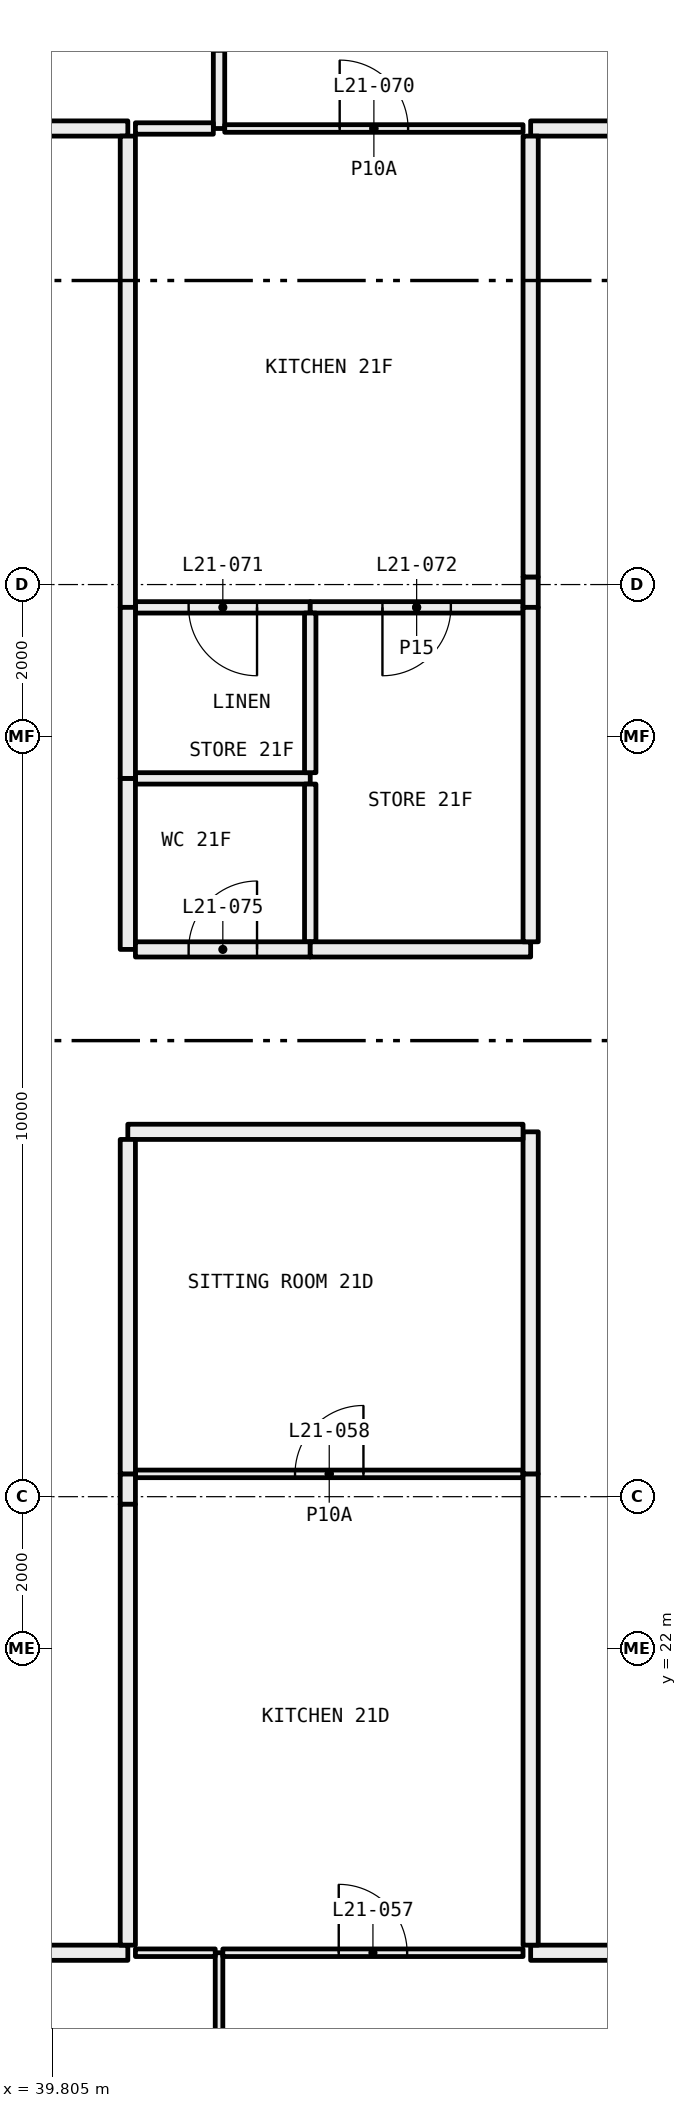
"""IFC4 building model, lengths in metres.
Left out: names, types, materials, properties, quantities, classifications, styles, units other than length and angle.
Written with IfcOpenShell. Run it as: python <this file> out.ifc"""

import sys

from ifc_helpers import new_model, si_unit, direction, frame, frame_2d, origin, place, context, subcontext, project, spatial, rectangle, extrude, element, fill, save


model = new_model("IFC4")
c1 = context("Model", 3, precision=1e-05, world=origin(), true_north=direction((0.0, 1.0)))
c2 = subcontext(c1, "Body", "Model", "MODEL_VIEW")
j1 = project(units=[si_unit("LENGTHUNIT", "METRE"), si_unit("PLANEANGLEUNIT", "RADIAN")], contexts=[c1])
p1 = place(None, origin())
s1 = spatial("IfcSite", under=j1, at=p1, CompositionType="ELEMENT")
p2 = place(p1, origin())
s2 = spatial("IfcBuilding", under=s1, at=p2, CompositionType="ELEMENT")
p3 = place(p2, frame((0.0, 0.0, 85.2)))
s3 = spatial("IfcBuildingStorey", under=s2, at=p3, CompositionType="ELEMENT", Elevation=85.2)
p4 = place(p3, frame((42.0, 12.05, 0.0), z_axis=(0.0, 0.0, 1.0), x_axis=(0.0, 1.0, 0.0)))
e1 = element("IfcWall", 1, at=p4, inside=s3, PredefinedType="PARTITIONING", context=c2, shape_type="SweptSolid", body=[
    extrude(rectangle(XDim=5.95, YDim=0.1, at=frame_2d((2.975, 0.0))), origin(), (0.0, 0.0, 1.0), 2.45),
])
p5 = place(p3, frame((41.95, 18.0, 0.0), z_axis=(0.0, 0.0, 1.0), x_axis=(-1.0, 0.0, 0.0)))
e2 = element("IfcWall", 2, at=p5, inside=s3, PredefinedType="PARTITIONING", context=c2, shape_type="SweptSolid", body=[
    extrude(rectangle(XDim=1.05, YDim=0.1, at=frame_2d((0.525, 0.0))), origin(), (0.0, 0.0, 1.0), 3.05),
])
p6 = place(p3, frame((40.8, 18.0, 0.0), z_axis=(0.0, 0.0, 1.0), x_axis=(-1.0, 0.0, 0.0)))
e3 = element("IfcWall", 3, at=p6, inside=s3, PredefinedType="PARTITIONING", context=c2, shape_type="SweptSolid", body=[
    extrude(rectangle(XDim=2.3, YDim=0.2, at=frame_2d((1.15, 0.0))), origin(), (0.0, 0.0, 1.0), 3.05),
])
p7 = place(p3, frame((46.0, 18.0, 0.0), z_axis=(0.0, 0.0, 1.0), x_axis=(-1.0, 0.0, 0.0)))
e4 = element("IfcWall", 4, at=p7, inside=s3, PredefinedType="PARTITIONING", context=c2, shape_type="SweptSolid", body=[
    extrude(rectangle(XDim=3.95, YDim=0.1, at=frame_2d((1.975, 0.0))), origin(), (0.0, 0.0, 1.0), 3.05),
])
p8 = place(p7, frame((1.525, 0.0, 0.0)))
e5 = element("IfcOpeningElement", 5, at=p8, cuts=e4, PredefinedType="OPENING", context=c2, shape_type="SweptSolid", body=[
    extrude(rectangle(XDim=0.9, YDim=2.1, at=frame_2d((0.45, 1.05))), frame((0.0, 0.06, 0.0), z_axis=(0.0, -1.0, 0.0), x_axis=(1.0, 0.0, 0.0)), (0.0, 0.0, 1.0), 0.12),
])
p9 = place(p3, frame((49.5, 18.0, 0.0), z_axis=(0.0, 0.0, 1.0), x_axis=(-1.0, 0.0, 0.0)))
e6 = element("IfcWall", 6, at=p9, inside=s3, PredefinedType="PARTITIONING", context=c2, shape_type="SweptSolid", body=[
    extrude(rectangle(XDim=3.4, YDim=0.2, at=frame_2d((1.7, 0.0))), origin(), (0.0, 0.0, 1.0), 3.05),
])
p10 = place(p3, frame((46.0, 24.3, 0.0), z_axis=(0.0, 0.0, 1.0), x_axis=(-1.0, 0.0, 0.0)))
e7 = element("IfcWall", 7, at=p10, inside=s3, PredefinedType="PARTITIONING", context=c2, shape_type="SweptSolid", body=[
    extrude(rectangle(XDim=5.1, YDim=0.1, at=frame_2d((2.55, 0.0))), origin(), (0.0, 0.0, 1.0), 3.05),
])
p11 = place(p10, frame((2.1, 0.0, 0.0)))
e8 = element("IfcOpeningElement", 8, at=p11, cuts=e7, PredefinedType="OPENING", context=c2, shape_type="SweptSolid", body=[
    extrude(rectangle(XDim=0.9, YDim=2.1, at=frame_2d((0.45, 1.05))), frame((0.0, 0.06, 0.0), z_axis=(0.0, -1.0, 0.0), x_axis=(1.0, 0.0, 0.0)), (0.0, 0.0, 1.0), 0.12),
])
p12 = place(p3, frame((40.8, 24.3, 0.0), z_axis=(0.0, 0.0, 1.0), x_axis=(0.0, -1.0, 0.0)))
e9 = element("IfcWall", 9, at=p12, inside=s3, PredefinedType="PARTITIONING", context=c2, shape_type="SweptSolid", body=[
    extrude(rectangle(XDim=0.4, YDim=0.2, at=frame_2d((0.2, 0.0))), origin(), (0.0, 0.0, 1.0), 2.45),
])
p13 = place(p3, frame((40.8, 23.9, 0.0), z_axis=(0.0, 0.0, 1.0), x_axis=(0.0, -1.0, 0.0)))
e10 = element("IfcWall", 10, at=p13, inside=s3, PredefinedType="PARTITIONING", context=c2, shape_type="SweptSolid", body=[
    extrude(rectangle(XDim=5.8, YDim=0.2, at=frame_2d((2.9, 0.0))), origin(), (0.0, 0.0, 1.0), 3.05),
])
p14 = place(p3, frame((46.1, 18.1, 0.0), z_axis=(0.0, 0.0, 1.0), x_axis=(0.0, 1.0, 0.0)))
e11 = element("IfcWall", 11, at=p14, inside=s3, PredefinedType="PARTITIONING", context=c2, shape_type="SweptSolid", body=[
    extrude(rectangle(XDim=6.2, YDim=0.2, at=frame_2d((3.1, 0.0))), origin(), (0.0, 0.0, 1.0), 2.45),
])
p15 = place(p3, frame((46.1, 24.3, 0.0), z_axis=(0.0, 0.0, 1.0), x_axis=(0.0, 1.0, 0.0)))
e12 = element("IfcWall", 12, at=p15, inside=s3, PredefinedType="PARTITIONING", context=c2, shape_type="SweptSolid", body=[
    extrude(rectangle(XDim=4.5, YDim=0.2, at=frame_2d((2.25, 0.0))), origin(), (0.0, 0.0, 1.0), 3.05),
])
p16 = place(p3, frame((46.0, 28.8, 0.0), z_axis=(0.0, 0.0, 1.0), x_axis=(-1.0, 0.0, 0.0)))
e13 = element("IfcWall", 13, at=p16, inside=s3, PredefinedType="PARTITIONING", context=c2, shape_type="SweptSolid", body=[
    extrude(rectangle(XDim=5.2, YDim=0.2, at=frame_2d((2.6, 0.0))), origin(), (0.0, 0.0, 1.0), 3.05),
])
p17 = place(p3, frame((40.8, 28.7, 0.0), z_axis=(0.0, 0.0, 1.0), x_axis=(0.0, -1.0, 0.0)))
e14 = element("IfcWall", 14, at=p17, inside=s3, PredefinedType="PARTITIONING", context=c2, shape_type="SweptSolid", body=[
    extrude(rectangle(XDim=4.4, YDim=0.2, at=frame_2d((2.2, 0.0))), origin(), (0.0, 0.0, 1.0), 3.05),
])
p18 = place(p3, frame((42.0, 42.0, 0.0), z_axis=(0.0, 0.0, 1.0), x_axis=(0.0, 1.0, 0.0)))
e15 = element("IfcWall", 15, at=p18, inside=s3, PredefinedType="PARTITIONING", context=c2, shape_type="SweptSolid", body=[
    extrude(rectangle(XDim=2.925, YDim=0.15, at=frame_2d((1.462, 0.0))), origin(), (0.0, 0.0, 1.0), 3.05),
])
p19 = place(p18, frame((1.012, 0.0, 0.0)))
e16 = element("IfcOpeningElement", 16, at=p19, cuts=e15, PredefinedType="OPENING", context=c2, shape_type="SweptSolid", body=[
    extrude(rectangle(XDim=0.9, YDim=2.1, at=frame_2d((0.45, 1.05))), frame((0.0, 0.085, 0.0), z_axis=(0.0, -1.0, 0.0), x_axis=(1.0, 0.0, 0.0)), (0.0, 0.0, 1.0), 0.17),
])
p20 = place(p3, frame((40.9, 42.0, 0.0), z_axis=(0.0, 0.0, 1.0), x_axis=(1.0, 0.0, 0.0)))
e17 = element("IfcWall", 17, at=p20, inside=s3, PredefinedType="PARTITIONING", context=c2, shape_type="SweptSolid", body=[
    extrude(rectangle(XDim=1.025, YDim=0.15, at=frame_2d((0.513, 0.0))), origin(), (0.0, 0.0, 1.0), 3.05),
])
p21 = place(p3, frame((38.5, 42.0, 0.0), z_axis=(0.0, 0.0, 1.0), x_axis=(1.0, 0.0, 0.0)))
e18 = element("IfcWall", 18, at=p21, inside=s3, PredefinedType="PARTITIONING", context=c2, shape_type="SweptSolid", body=[
    extrude(rectangle(XDim=2.3, YDim=0.2, at=frame_2d((1.15, 0.0))), origin(), (0.0, 0.0, 1.0), 3.05),
])
p22 = place(p3, frame((42.075, 42.0, 0.0), z_axis=(0.0, 0.0, 1.0), x_axis=(1.0, 0.0, 0.0)))
e19 = element("IfcWall", 19, at=p22, inside=s3, PredefinedType="PARTITIONING", context=c2, shape_type="SweptSolid", body=[
    extrude(rectangle(XDim=3.925, YDim=0.1, at=frame_2d((1.962, 0.0))), origin(), (0.0, 0.0, 1.0), 3.05),
])
p23 = place(p22, frame((1.512, 0.0, 0.0)))
e20 = element("IfcOpeningElement", 20, at=p23, cuts=e19, PredefinedType="OPENING", context=c2, shape_type="SweptSolid", body=[
    extrude(rectangle(XDim=0.9, YDim=2.1, at=frame_2d((0.45, 1.05))), frame((0.0, 0.06, 0.0), z_axis=(0.0, -1.0, 0.0), x_axis=(1.0, 0.0, 0.0)), (0.0, 0.0, 1.0), 0.12),
])
p24 = place(p3, frame((46.1, 42.0, 0.0), z_axis=(0.0, 0.0, 1.0), x_axis=(1.0, 0.0, 0.0)))
e21 = element("IfcWall", 21, at=p24, inside=s3, PredefinedType="PARTITIONING", context=c2, shape_type="SweptSolid", body=[
    extrude(rectangle(XDim=1.9, YDim=0.2, at=frame_2d((0.95, 0.0))), origin(), (0.0, 0.0, 1.0), 3.05),
])
p25 = place(p3, frame((40.9, 35.7, 0.0), z_axis=(0.0, 0.0, 1.0), x_axis=(1.0, 0.0, 0.0)))
e22 = element("IfcWall", 22, at=p25, inside=s3, PredefinedType="PARTITIONING", context=c2, shape_type="SweptSolid", body=[
    extrude(rectangle(XDim=2.3, YDim=0.15, at=frame_2d((1.15, 0.0))), origin(), (0.0, 0.0, 1.0), 3.05),
])
p26 = place(p25, frame((0.7, 0.0, 0.0)))
e23 = element("IfcOpeningElement", 23, at=p26, cuts=e22, PredefinedType="OPENING", context=c2, shape_type="SweptSolid", body=[
    extrude(rectangle(XDim=0.9, YDim=2.1, at=frame_2d((0.45, 1.05))), frame((0.0, 0.085, 0.0), z_axis=(0.0, -1.0, 0.0), x_axis=(1.0, 0.0, 0.0)), (0.0, 0.0, 1.0), 0.17),
])
p27 = place(p3, frame((43.2, 35.7, 0.0), z_axis=(0.0, 0.0, 1.0), x_axis=(1.0, 0.0, 0.0)))
e24 = element("IfcWall", 24, at=p27, inside=s3, PredefinedType="PARTITIONING", context=c2, shape_type="SweptSolid", body=[
    extrude(rectangle(XDim=2.8, YDim=0.15, at=frame_2d((1.4, 0.0))), origin(), (0.0, 0.0, 1.0), 3.05),
])
p28 = place(p27, frame((0.95, 0.0, 0.0)))
e25 = element("IfcOpeningElement", 25, at=p28, cuts=e24, PredefinedType="OPENING", context=c2, shape_type="SweptSolid", body=[
    extrude(rectangle(XDim=0.9, YDim=2.1, at=frame_2d((0.45, 1.05))), frame((0.0, 0.085, 0.0), z_axis=(0.0, -1.0, 0.0), x_axis=(1.0, 0.0, 0.0)), (0.0, 0.0, 1.0), 0.17),
])
p29 = place(p3, frame((40.8, 41.9, 0.0), z_axis=(0.0, 0.0, 1.0), x_axis=(0.0, -1.0, 0.0)))
e26 = element("IfcWall", 26, at=p29, inside=s3, PredefinedType="PARTITIONING", context=c2, shape_type="SweptSolid", body=[
    extrude(rectangle(XDim=6.2, YDim=0.2, at=frame_2d((3.1, 0.0))), origin(), (0.0, 0.0, 1.0), 2.45),
])
p30 = place(p3, frame((46.1, 35.7, 0.0), z_axis=(0.0, 0.0, 1.0), x_axis=(0.0, 1.0, 0.0)))
e27 = element("IfcWall", 27, at=p30, inside=s3, PredefinedType="PARTITIONING", context=c2, shape_type="SweptSolid", body=[
    extrude(rectangle(XDim=0.4, YDim=0.2, at=frame_2d((0.2, 0.0))), origin(), (0.0, 0.0, 1.0), 2.45),
])
p31 = place(p3, frame((46.1, 36.1, 0.0), z_axis=(0.0, 0.0, 1.0), x_axis=(0.0, 1.0, 0.0)))
e28 = element("IfcWall", 28, at=p31, inside=s3, PredefinedType="PARTITIONING", context=c2, shape_type="SweptSolid", body=[
    extrude(rectangle(XDim=5.8, YDim=0.2, at=frame_2d((2.9, 0.0))), origin(), (0.0, 0.0, 1.0), 3.05),
])
p32 = place(p3, frame((43.2, 33.45, 0.0), z_axis=(0.0, 0.0, 1.0), x_axis=(-1.0, 0.0, 0.0)))
e29 = element("IfcWall", 29, at=p32, inside=s3, PredefinedType="PARTITIONING", context=c2, shape_type="SweptSolid", body=[
    extrude(rectangle(XDim=2.3, YDim=0.15, at=frame_2d((1.15, 0.0))), origin(), (0.0, 0.0, 1.0), 3.05),
])
p33 = place(p3, frame((43.2, 31.3, 0.0), z_axis=(0.0, 0.0, 1.0), x_axis=(0.0, 1.0, 0.0)))
e30 = element("IfcWall", 30, at=p33, inside=s3, PredefinedType="PARTITIONING", context=c2, shape_type="SweptSolid", body=[
    extrude(rectangle(XDim=2.075, YDim=0.15, at=frame_2d((1.038, 0.0))), origin(), (0.0, 0.0, 1.0), 3.05),
])
p34 = place(p3, frame((40.8, 33.45, 0.0), z_axis=(0.0, 0.0, 1.0), x_axis=(0.0, -1.0, 0.0)))
e31 = element("IfcWall", 31, at=p34, inside=s3, PredefinedType="PARTITIONING", context=c2, shape_type="SweptSolid", body=[
    extrude(rectangle(XDim=2.25, YDim=0.2, at=frame_2d((1.125, 0.0))), origin(), (0.0, 0.0, 1.0), 3.05),
])
p35 = place(p3, frame((40.9, 31.2, 0.0), z_axis=(0.0, 0.0, 1.0), x_axis=(1.0, 0.0, 0.0)))
e32 = element("IfcWall", 32, at=p35, inside=s3, PredefinedType="PARTITIONING", context=c2, shape_type="SweptSolid", body=[
    extrude(rectangle(XDim=2.3, YDim=0.2, at=frame_2d((1.15, 0.0))), origin(), (0.0, 0.0, 1.0), 3.05),
])
p36 = place(p35, frame((0.7, 0.0, 0.0)))
e33 = element("IfcOpeningElement", 33, at=p36, cuts=e32, PredefinedType="OPENING", context=c2, shape_type="SweptSolid", body=[
    extrude(rectangle(XDim=0.9, YDim=2.1, at=frame_2d((0.45, 1.05))), frame((0.0, 0.11, 0.0), z_axis=(0.0, -1.0, 0.0), x_axis=(1.0, 0.0, 0.0)), (0.0, 0.0, 1.0), 0.22),
])
p37 = place(p3, frame((43.2, 33.525, 0.0), z_axis=(0.0, 0.0, 1.0), x_axis=(0.0, 1.0, 0.0)))
e34 = element("IfcWall", 34, at=p37, inside=s3, PredefinedType="PARTITIONING", context=c2, shape_type="SweptSolid", body=[
    extrude(rectangle(XDim=2.1, YDim=0.15, at=frame_2d((1.05, 0.0))), origin(), (0.0, 0.0, 1.0), 3.05),
])
p38 = place(p3, frame((40.8, 35.7, 0.0), z_axis=(0.0, 0.0, 1.0), x_axis=(0.0, -1.0, 0.0)))
e35 = element("IfcWall", 35, at=p38, inside=s3, PredefinedType="PARTITIONING", context=c2, shape_type="SweptSolid", body=[
    extrude(rectangle(XDim=2.25, YDim=0.2, at=frame_2d((1.125, 0.0))), origin(), (0.0, 0.0, 1.0), 3.05),
])
p39 = place(p3, frame((43.2, 31.2, 0.0), z_axis=(0.0, 0.0, 1.0), x_axis=(1.0, 0.0, 0.0)))
e36 = element("IfcWall", 36, at=p39, inside=s3, PredefinedType="PARTITIONING", context=c2, shape_type="SweptSolid", body=[
    extrude(rectangle(XDim=2.9, YDim=0.2, at=frame_2d((1.45, 0.0))), origin(), (0.0, 0.0, 1.0), 3.05),
])
p40 = place(p3, frame((46.1, 31.3, 0.0), z_axis=(0.0, 0.0, 1.0), x_axis=(0.0, 1.0, 0.0)))
e37 = element("IfcWall", 37, at=p40, inside=s3, PredefinedType="PARTITIONING", context=c2, shape_type="SweptSolid", body=[
    extrude(rectangle(XDim=4.4, YDim=0.2, at=frame_2d((2.2, 0.0))), origin(), (0.0, 0.0, 1.0), 3.05),
])
p41 = place(p8, frame((0.9, 0.0, 0.0), x_axis=(-1.0, 0.0, 0.0)))
e38 = element("IfcDoor", 38, at=p41, inside=s3, OperationType="SINGLE_SWING_RIGHT", PredefinedType="DOOR", context=c2, shape_type="SweptSolid", body=[
    extrude(rectangle(XDim=0.9, YDim=2.1, at=frame_2d((0.45, 1.05))), frame((0.0, 0.025, 0.0), z_axis=(0.0, -1.0, 0.0), x_axis=(1.0, 0.0, 0.0)), (0.0, 0.0, 1.0), 0.05),
])
fill(e5, e38)
p42 = place(p11, frame((0.9, 0.0, 0.0), x_axis=(-1.0, 0.0, 0.0)))
e39 = element("IfcDoor", 39, at=p42, inside=s3, OperationType="SINGLE_SWING_LEFT", PredefinedType="DOOR", context=c2, shape_type="SweptSolid", body=[
    extrude(rectangle(XDim=0.9, YDim=2.1, at=frame_2d((0.45, 1.05))), frame((0.0, 0.025, 0.0), z_axis=(0.0, -1.0, 0.0), x_axis=(1.0, 0.0, 0.0)), (0.0, 0.0, 1.0), 0.05),
])
fill(e8, e39)
p43 = place(p23, origin())
e40 = element("IfcDoor", 40, at=p43, inside=s3, OperationType="SINGLE_SWING_RIGHT", PredefinedType="DOOR", context=c2, shape_type="SweptSolid", body=[
    extrude(rectangle(XDim=0.9, YDim=2.1, at=frame_2d((0.45, 1.05))), frame((0.0, 0.025, 0.0), z_axis=(0.0, -1.0, 0.0), x_axis=(1.0, 0.0, 0.0)), (0.0, 0.0, 1.0), 0.05),
])
fill(e20, e40)
p44 = place(p26, frame((0.9, 0.0, 0.0), x_axis=(-1.0, 0.0, 0.0)))
e41 = element("IfcDoor", 41, at=p44, inside=s3, OperationType="SINGLE_SWING_RIGHT", PredefinedType="DOOR", context=c2, shape_type="SweptSolid", body=[
    extrude(rectangle(XDim=0.9, YDim=2.1, at=frame_2d((0.45, 1.05))), frame((0.0, 0.025, 0.0), z_axis=(0.0, -1.0, 0.0), x_axis=(1.0, 0.0, 0.0)), (0.0, 0.0, 1.0), 0.05),
])
fill(e23, e41)
p45 = place(p28, frame((0.9, 0.0, 0.0), x_axis=(-1.0, 0.0, 0.0)))
e42 = element("IfcDoor", 42, at=p45, inside=s3, OperationType="SINGLE_SWING_LEFT", PredefinedType="DOOR", context=c2, shape_type="SweptSolid", body=[
    extrude(rectangle(XDim=0.9, YDim=2.1, at=frame_2d((0.45, 1.05))), frame((0.0, 0.025, 0.0), z_axis=(0.0, -1.0, 0.0), x_axis=(1.0, 0.0, 0.0)), (0.0, 0.0, 1.0), 0.05),
])
fill(e25, e42)
p46 = place(p36, origin())
e43 = element("IfcDoor", 43, at=p46, inside=s3, OperationType="SINGLE_SWING_LEFT", PredefinedType="DOOR", context=c2, shape_type="SweptSolid", body=[
    extrude(rectangle(XDim=0.9, YDim=2.1, at=frame_2d((0.45, 1.05))), frame((0.0, 0.025, 0.0), z_axis=(0.0, -1.0, 0.0), x_axis=(1.0, 0.0, 0.0)), (0.0, 0.0, 1.0), 0.05),
])
fill(e33, e43)
save(model, sys.argv[1])
